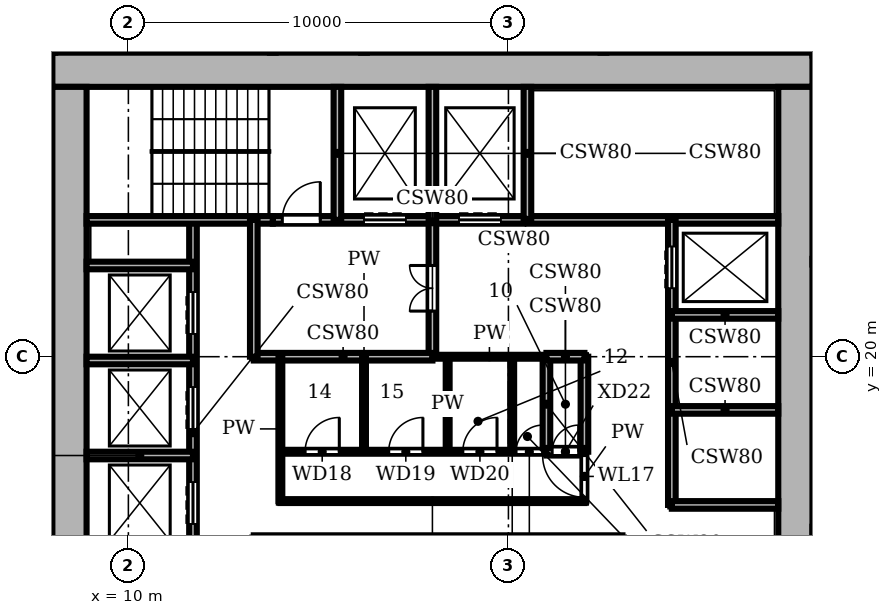
"""IFC4 building model, lengths in metres.
Left out: names, types, materials, properties, quantities, classifications, styles, units other than length and angle.
Written with IfcOpenShell. Run it as: python <this file> out.ifc"""

import sys

from ifc_helpers import new_model, si_unit, direction, frame, frame_2d, origin, place, context, subcontext, project, spatial, rectangle, extrude, element, fill, save


model = new_model("IFC4")
c1 = context("Model", 3, precision=1e-05, world=origin(), true_north=direction((0.0, 1.0)))
c2 = subcontext(c1, "Body", "Model", "MODEL_VIEW")
j1 = project(units=[si_unit("LENGTHUNIT", "METRE"), si_unit("PLANEANGLEUNIT", "RADIAN")], contexts=[c1])
p1 = place(None, origin())
s1 = spatial("IfcSite", under=j1, at=p1, CompositionType="ELEMENT")
p2 = place(p1, origin())
s2 = spatial("IfcBuilding", under=s1, at=p2, CompositionType="ELEMENT")
p3 = place(p2, frame((0.0, 0.0, 35.4)))
s3 = spatial("IfcBuildingStorey", under=s2, at=p3, CompositionType="ELEMENT", Elevation=35.4)
p4 = place(p3, frame((27.55, 8.9, 0.0), z_axis=(0.0, 0.0, 1.0), x_axis=(0.0, 1.0, 0.0)))
e1 = element("IfcWall", 1, at=p4, inside=s3, PredefinedType="SHEAR", context=c2, shape_type="SweptSolid", body=[
    extrude(rectangle(XDim=18.2, YDim=0.9, at=frame_2d((9.1, 0.0))), origin(), (0.0, 0.0, 1.0), 3.9),
])
p5 = place(p4, frame((4.55, 0.0, 0.0)))
e2 = element("IfcOpeningElement", 2, at=p5, cuts=e1, PredefinedType="OPENING", context=c2, shape_type="SweptSolid", body=[
    extrude(rectangle(XDim=1.6, YDim=2.1, at=frame_2d((0.8, 1.05))), frame((0.0, 0.46, 0.0), z_axis=(0.0, -1.0, 0.0), x_axis=(1.0, 0.0, 0.0)), (0.0, 0.0, 1.0), 0.92),
])
p6 = place(p3, frame((28.0, 27.55, 0.0), z_axis=(0.0, 0.0, 1.0), x_axis=(-1.0, 0.0, 0.0)))
e3 = element("IfcWall", 3, at=p6, inside=s3, PredefinedType="SHEAR", context=c2, shape_type="SweptSolid", body=[
    extrude(rectangle(XDim=20.0, YDim=0.9, at=frame_2d((10.0, 0.0))), origin(), (0.0, 0.0, 1.0), 3.9),
])
p7 = place(p3, frame((8.45, 27.1, 0.0), z_axis=(0.0, 0.0, 1.0), x_axis=(0.0, -1.0, 0.0)))
e4 = element("IfcWall", 4, at=p7, inside=s3, PredefinedType="SHEAR", context=c2, shape_type="SweptSolid", body=[
    extrude(rectangle(XDim=18.2, YDim=0.9, at=frame_2d((9.1, 0.0))), origin(), (0.0, 0.0, 1.0), 3.9),
])
p8 = place(p3, frame((24.3, 16.1, 0.0), z_axis=(0.0, 0.0, 1.0), x_axis=(1.0, 0.0, 0.0)))
e5 = element("IfcWall", 5, at=p8, inside=s3, PredefinedType="SHEAR", context=c2, shape_type="SweptSolid", body=[
    extrude(rectangle(XDim=2.8, YDim=0.2, at=frame_2d((1.4, 0.0))), origin(), (0.0, 0.0, 1.0), 3.58),
])
p9 = place(p3, frame((14.0, 16.2, 0.0), z_axis=(0.0, 0.0, 1.0), x_axis=(1.0, 0.0, 0.0)))
e6 = element("IfcWall", 6, at=p9, inside=s3, PredefinedType="PARTITIONING", context=c2, shape_type="SweptSolid", body=[
    extrude(rectangle(XDim=8.0, YDim=0.1, at=frame_2d((4.0, 0.0))), origin(), (0.0, 0.0, 1.0), 3.58),
])
p10 = place(p3, frame((8.9, 17.4, 0.0), z_axis=(0.0, 0.0, 1.0), x_axis=(1.0, 0.0, 0.0)))
e7 = element("IfcWall", 7, at=p10, inside=s3, PredefinedType="SHEAR", context=c2, shape_type="SweptSolid", body=[
    extrude(rectangle(XDim=2.8, YDim=0.2, at=frame_2d((1.4, 0.0))), origin(), (0.0, 0.0, 1.0), 3.58),
])
p11 = place(p3, frame((14.0, 17.5, 0.0), z_axis=(0.0, 0.0, 1.0), x_axis=(1.0, 0.0, 0.0)))
e8 = element("IfcWall", 8, at=p11, inside=s3, PredefinedType="PARTITIONING", context=c2, shape_type="SweptSolid", body=[
    extrude(rectangle(XDim=7.0, YDim=0.1, at=frame_2d((3.5, 0.0))), origin(), (0.0, 0.0, 1.0), 3.58),
])
p12 = place(p11, frame((0.65, 0.0, 0.0)))
e9 = element("IfcOpeningElement", 9, at=p12, cuts=e8, PredefinedType="OPENING", context=c2, shape_type="SweptSolid", body=[
    extrude(rectangle(XDim=0.9, YDim=2.1, at=frame_2d((0.45, 1.05))), frame((0.0, 0.06, 0.0), z_axis=(0.0, -1.0, 0.0), x_axis=(1.0, 0.0, 0.0)), (0.0, 0.0, 1.0), 0.12),
])
p13 = place(p11, frame((2.85, 0.0, 0.0)))
e10 = element("IfcOpeningElement", 10, at=p13, cuts=e8, PredefinedType="OPENING", context=c2, shape_type="SweptSolid", body=[
    extrude(rectangle(XDim=0.9, YDim=2.1, at=frame_2d((0.45, 1.05))), frame((0.0, 0.06, 0.0), z_axis=(0.0, -1.0, 0.0), x_axis=(1.0, 0.0, 0.0)), (0.0, 0.0, 1.0), 0.12),
])
p14 = place(p11, frame((4.8, 0.0, 0.0)))
e11 = element("IfcOpeningElement", 11, at=p14, cuts=e8, PredefinedType="OPENING", context=c2, shape_type="SweptSolid", body=[
    extrude(rectangle(XDim=0.9, YDim=2.1, at=frame_2d((0.45, 1.05))), frame((0.0, 0.06, 0.0), z_axis=(0.0, -1.0, 0.0), x_axis=(1.0, 0.0, 0.0)), (0.0, 0.0, 1.0), 0.12),
])
p15 = place(p11, frame((6.2, 0.0, 0.0)))
e12 = element("IfcOpeningElement", 12, at=p15, cuts=e8, PredefinedType="OPENING", context=c2, shape_type="SweptSolid", body=[
    extrude(rectangle(XDim=0.7, YDim=2.1, at=frame_2d((0.35, 1.05))), frame((0.0, 0.06, 0.0), z_axis=(0.0, -1.0, 0.0), x_axis=(1.0, 0.0, 0.0)), (0.0, 0.0, 1.0), 0.12),
])
p16 = place(p3, frame((21.0, 17.5, 0.0), z_axis=(0.0, 0.0, 1.0), x_axis=(1.0, 0.0, 0.0)))
e13 = element("IfcWall", 13, at=p16, inside=s3, PredefinedType="SHEAR", context=c2, shape_type="SweptSolid", body=[
    extrude(rectangle(XDim=1.0, YDim=0.2, at=frame_2d((0.5, 0.0))), origin(), (0.0, 0.0, 1.0), 3.58),
])
p17 = place(p16, frame((0.15, 0.0, 0.0)))
e14 = element("IfcOpeningElement", 14, at=p17, cuts=e13, PredefinedType="OPENING", context=c2, shape_type="SweptSolid", body=[
    extrude(rectangle(XDim=0.7, YDim=2.1, at=frame_2d((0.35, 1.05))), frame((0.0, 0.11, 0.0), z_axis=(0.0, -1.0, 0.0), x_axis=(1.0, 0.0, 0.0)), (0.0, 0.0, 1.0), 0.22),
])
for number, where, z_axis, x_axis in (
    (15, (24.3, 18.6, 0.0), (0.0, 0.0, 1.0), (1.0, 0.0, 0.0)),
    (16, (8.9, 19.9, 0.0), (0.0, 0.0, 1.0), (1.0, 0.0, 0.0)),
):
    element("IfcWall", number, at=place(p3, frame(where, z_axis=z_axis, x_axis=x_axis)), inside=s3, PredefinedType="SHEAR", context=c2, shape_type="SweptSolid", body=[
        extrude(rectangle(XDim=2.8, YDim=0.2, at=frame_2d((1.4, 0.0))), origin(), (0.0, 0.0, 1.0), 3.58),
    ])
p18 = place(p3, frame((18.0, 20.0, 0.0), z_axis=(0.0, 0.0, 1.0), x_axis=(1.0, 0.0, 0.0)))
e17 = element("IfcWall", 17, at=p18, inside=s3, PredefinedType="PARTITIONING", context=c2, shape_type="SweptSolid", body=[
    extrude(rectangle(XDim=3.0, YDim=0.1, at=frame_2d((1.5, 0.0))), origin(), (0.0, 0.0, 1.0), 3.58),
])
p19 = place(p3, frame((13.3, 20.0, 0.0), z_axis=(0.0, 0.0, 1.0), x_axis=(1.0, 0.0, 0.0)))
e18 = element("IfcWall", 18, at=p19, inside=s3, PredefinedType="SHEAR", context=c2, shape_type="SweptSolid", body=[
    extrude(rectangle(XDim=4.7, YDim=0.2, at=frame_2d((2.35, 0.0))), origin(), (0.0, 0.0, 1.0), 3.58),
])
p20 = place(p3, frame((21.0, 20.0, 0.0), z_axis=(0.0, 0.0, 1.0), x_axis=(1.0, 0.0, 0.0)))
e19 = element("IfcWall", 19, at=p20, inside=s3, PredefinedType="SHEAR", context=c2, shape_type="SweptSolid", body=[
    extrude(rectangle(XDim=1.0, YDim=0.2, at=frame_2d((0.5, 0.0))), origin(), (0.0, 0.0, 1.0), 3.58),
])
for number, where, z_axis, x_axis in (
    (20, (24.3, 21.1, 0.0), (0.0, 0.0, 1.0), (1.0, 0.0, 0.0)),
    (21, (8.9, 22.4, 0.0), (0.0, 0.0, 1.0), (1.0, 0.0, 0.0)),
):
    element("IfcWall", number, at=place(p3, frame(where, z_axis=z_axis, x_axis=x_axis)), inside=s3, PredefinedType="SHEAR", context=c2, shape_type="SweptSolid", body=[
        extrude(rectangle(XDim=2.8, YDim=0.2, at=frame_2d((1.4, 0.0))), origin(), (0.0, 0.0, 1.0), 3.58),
    ])
p21 = place(p3, frame((8.9, 23.6, 0.0), z_axis=(0.0, 0.0, 1.0), x_axis=(1.0, 0.0, 0.0)))
e22 = element("IfcWall", 22, at=p21, inside=s3, PredefinedType="SHEAR", context=c2, shape_type="SweptSolid", body=[
    extrude(rectangle(XDim=4.9, YDim=0.2, at=frame_2d((2.45, 0.0))), origin(), (0.0, 0.0, 1.0), 3.58),
])
p22 = place(p3, frame((13.8, 23.6, 0.0), z_axis=(0.0, 0.0, 1.0), x_axis=(1.0, 0.0, 0.0)))
e23 = element("IfcWall", 23, at=p22, inside=s3, PredefinedType="SHEAR", context=c2, shape_type="SweptSolid", body=[
    extrude(rectangle(XDim=13.3, YDim=0.2, at=frame_2d((6.65, 0.0))), origin(), (0.0, 0.0, 1.0), 3.58),
])
p23 = place(p22, frame((2.4, 0.0, 0.0)))
e24 = element("IfcOpeningElement", 24, at=p23, cuts=e23, PredefinedType="OPENING", context=c2, shape_type="SweptSolid", body=[
    extrude(rectangle(XDim=1.1, YDim=2.1, at=frame_2d((0.55, 1.05))), frame((0.0, 0.11, 0.0), z_axis=(0.0, -1.0, 0.0), x_axis=(1.0, 0.0, 0.0)), (0.0, 0.0, 1.0), 0.22),
])
p24 = place(p22, frame((4.9, 0.0, 0.0)))
e25 = element("IfcOpeningElement", 25, at=p24, cuts=e23, PredefinedType="OPENING", context=c2, shape_type="SweptSolid", body=[
    extrude(rectangle(XDim=1.1, YDim=2.1, at=frame_2d((0.55, 1.05))), frame((0.0, 0.11, 0.0), z_axis=(0.0, -1.0, 0.0), x_axis=(1.0, 0.0, 0.0)), (0.0, 0.0, 1.0), 0.22),
])
p25 = place(p22, frame((0.25, 0.0, 0.0)))
e26 = element("IfcOpeningElement", 26, at=p25, cuts=e23, PredefinedType="OPENING", context=c2, shape_type="SweptSolid", body=[
    extrude(rectangle(XDim=1.0, YDim=2.1, at=frame_2d((0.5, 1.05))), frame((0.0, 0.11, 0.0), z_axis=(0.0, -1.0, 0.0), x_axis=(1.0, 0.0, 0.0)), (0.0, 0.0, 1.0), 0.22),
])
p26 = place(p3, frame((11.7, 12.4, 0.0), z_axis=(0.0, 0.0, 1.0), x_axis=(0.0, 1.0, 0.0)))
e27 = element("IfcWall", 27, at=p26, inside=s3, PredefinedType="SHEAR", context=c2, shape_type="SweptSolid", body=[
    extrude(rectangle(XDim=11.2, YDim=0.2, at=frame_2d((5.6, 0.0))), origin(), (0.0, 0.0, 1.0), 3.58),
])
p27 = place(p26, frame((0.7, 0.0, 0.0)))
e28 = element("IfcOpeningElement", 28, at=p27, cuts=e27, PredefinedType="OPENING", context=c2, shape_type="SweptSolid", body=[
    extrude(rectangle(XDim=1.1, YDim=2.1, at=frame_2d((0.55, 1.05))), frame((0.0, 0.11, 0.0), z_axis=(0.0, -1.0, 0.0), x_axis=(1.0, 0.0, 0.0)), (0.0, 0.0, 1.0), 0.22),
])
p28 = place(p26, frame((3.2, 0.0, 0.0)))
e29 = element("IfcOpeningElement", 29, at=p28, cuts=e27, PredefinedType="OPENING", context=c2, shape_type="SweptSolid", body=[
    extrude(rectangle(XDim=1.1, YDim=2.1, at=frame_2d((0.55, 1.05))), frame((0.0, 0.11, 0.0), z_axis=(0.0, -1.0, 0.0), x_axis=(1.0, 0.0, 0.0)), (0.0, 0.0, 1.0), 0.22),
])
p29 = place(p26, frame((5.7, 0.0, 0.0)))
e30 = element("IfcOpeningElement", 30, at=p29, cuts=e27, PredefinedType="OPENING", context=c2, shape_type="SweptSolid", body=[
    extrude(rectangle(XDim=1.1, YDim=2.1, at=frame_2d((0.55, 1.05))), frame((0.0, 0.11, 0.0), z_axis=(0.0, -1.0, 0.0), x_axis=(1.0, 0.0, 0.0)), (0.0, 0.0, 1.0), 0.22),
])
p30 = place(p26, frame((8.2, 0.0, 0.0)))
e31 = element("IfcOpeningElement", 31, at=p30, cuts=e27, PredefinedType="OPENING", context=c2, shape_type="SweptSolid", body=[
    extrude(rectangle(XDim=1.1, YDim=2.1, at=frame_2d((0.55, 1.05))), frame((0.0, 0.11, 0.0), z_axis=(0.0, -1.0, 0.0), x_axis=(1.0, 0.0, 0.0)), (0.0, 0.0, 1.0), 0.22),
])
p31 = place(p3, frame((13.3, 20.0, 0.0), z_axis=(0.0, 0.0, 1.0), x_axis=(0.0, 1.0, 0.0)))
e32 = element("IfcWall", 32, at=p31, inside=s3, PredefinedType="SHEAR", context=c2, shape_type="SweptSolid", body=[
    extrude(rectangle(XDim=3.6, YDim=0.2, at=frame_2d((1.8, 0.0))), origin(), (0.0, 0.0, 1.0), 3.58),
])
p32 = place(p3, frame((14.0, 16.2, 0.0), z_axis=(0.0, 0.0, 1.0), x_axis=(0.0, 1.0, 0.0)))
e33 = element("IfcWall", 33, at=p32, inside=s3, PredefinedType="PARTITIONING", context=c2, shape_type="SweptSolid", body=[
    extrude(rectangle(XDim=3.8, YDim=0.1, at=frame_2d((1.9, 0.0))), origin(), (0.0, 0.0, 1.0), 3.58),
])
p33 = place(p3, frame((15.5, 23.6, 0.0), z_axis=(0.0, 0.0, 1.0), x_axis=(0.0, 1.0, 0.0)))
e34 = element("IfcWall", 34, at=p33, inside=s3, PredefinedType="SHEAR", context=c2, shape_type="SweptSolid", body=[
    extrude(rectangle(XDim=3.5, YDim=0.2, at=frame_2d((1.75, 0.0))), origin(), (0.0, 0.0, 1.0), 3.58),
])
p34 = place(p3, frame((16.2, 17.5, 0.0), z_axis=(0.0, 0.0, 1.0), x_axis=(0.0, 1.0, 0.0)))
e35 = element("IfcWall", 35, at=p34, inside=s3, PredefinedType="PARTITIONING", context=c2, shape_type="SweptSolid", body=[
    extrude(rectangle(XDim=2.5, YDim=0.1, at=frame_2d((1.25, 0.0))), origin(), (0.0, 0.0, 1.0), 3.58),
])
p35 = place(p3, frame((18.0, 20.0, 0.0), z_axis=(0.0, 0.0, 1.0), x_axis=(0.0, 1.0, 0.0)))
e36 = element("IfcWall", 36, at=p35, inside=s3, PredefinedType="SHEAR", context=c2, shape_type="SweptSolid", body=[
    extrude(rectangle(XDim=7.1, YDim=0.2, at=frame_2d((3.55, 0.0))), origin(), (0.0, 0.0, 1.0), 3.58),
])
p36 = place(p35, frame((1.2, 0.0, 0.0)))
e37 = element("IfcOpeningElement", 37, at=p36, cuts=e36, PredefinedType="OPENING", context=c2, shape_type="SweptSolid", body=[
    extrude(rectangle(XDim=1.2, YDim=2.1, at=frame_2d((0.6, 1.05))), frame((0.0, 0.11, 0.0), z_axis=(0.0, -1.0, 0.0), x_axis=(1.0, 0.0, 0.0)), (0.0, 0.0, 1.0), 0.22),
])
for number, where, z_axis, x_axis in (
    (38, (18.4, 17.5, 0.0), (0.0, 0.0, 1.0), (0.0, 1.0, 0.0)),
    (39, (20.1, 17.5, 0.0), (0.0, 0.0, 1.0), (0.0, 1.0, 0.0)),
):
    element("IfcWall", number, at=place(p3, frame(where, z_axis=z_axis, x_axis=x_axis)), inside=s3, PredefinedType="PARTITIONING", context=c2, shape_type="SweptSolid", body=[
        extrude(rectangle(XDim=2.5, YDim=0.1, at=frame_2d((1.25, 0.0))), origin(), (0.0, 0.0, 1.0), 3.58),
    ])
p37 = place(p3, frame((20.5, 23.6, 0.0), z_axis=(0.0, 0.0, 1.0), x_axis=(0.0, 1.0, 0.0)))
e40 = element("IfcWall", 40, at=p37, inside=s3, PredefinedType="SHEAR", context=c2, shape_type="SweptSolid", body=[
    extrude(rectangle(XDim=3.5, YDim=0.2, at=frame_2d((1.75, 0.0))), origin(), (0.0, 0.0, 1.0), 3.58),
])
p38 = place(p3, frame((21.0, 17.5, 0.0), z_axis=(0.0, 0.0, 1.0), x_axis=(0.0, 1.0, 0.0)))
e41 = element("IfcWall", 41, at=p38, inside=s3, PredefinedType="SHEAR", context=c2, shape_type="SweptSolid", body=[
    extrude(rectangle(XDim=2.5, YDim=0.2, at=frame_2d((1.25, 0.0))), origin(), (0.0, 0.0, 1.0), 3.58),
])
p39 = place(p3, frame((22.0, 16.2, 0.0), z_axis=(0.0, 0.0, 1.0), x_axis=(0.0, 1.0, 0.0)))
e42 = element("IfcWall", 42, at=p39, inside=s3, PredefinedType="PARTITIONING", context=c2, shape_type="SweptSolid", body=[
    extrude(rectangle(XDim=1.3, YDim=0.1, at=frame_2d((0.65, 0.0))), origin(), (0.0, 0.0, 1.0), 3.58),
])
p40 = place(p39, frame((0.1, 0.0, 0.0)))
e43 = element("IfcOpeningElement", 43, at=p40, cuts=e42, PredefinedType="OPENING", context=c2, shape_type="SweptSolid", body=[
    extrude(rectangle(XDim=1.1, YDim=2.1, at=frame_2d((0.55, 1.05))), frame((0.0, 0.06, 0.0), z_axis=(0.0, -1.0, 0.0), x_axis=(1.0, 0.0, 0.0)), (0.0, 0.0, 1.0), 0.12),
])
p41 = place(p3, frame((22.0, 17.5, 0.0), z_axis=(0.0, 0.0, 1.0), x_axis=(0.0, 1.0, 0.0)))
e44 = element("IfcWall", 44, at=p41, inside=s3, PredefinedType="SHEAR", context=c2, shape_type="SweptSolid", body=[
    extrude(rectangle(XDim=2.5, YDim=0.2, at=frame_2d((1.25, 0.0))), origin(), (0.0, 0.0, 1.0), 3.58),
])
p42 = place(p3, frame((24.3, 16.1, 0.0), z_axis=(0.0, 0.0, 1.0), x_axis=(0.0, 1.0, 0.0)))
e45 = element("IfcWall", 45, at=p42, inside=s3, PredefinedType="SHEAR", context=c2, shape_type="SweptSolid", body=[
    extrude(rectangle(XDim=7.5, YDim=0.2, at=frame_2d((3.75, 0.0))), origin(), (0.0, 0.0, 1.0), 3.58),
])
p43 = place(p42, frame((5.7, 0.0, 0.0)))
e46 = element("IfcOpeningElement", 46, at=p43, cuts=e45, PredefinedType="OPENING", context=c2, shape_type="SweptSolid", body=[
    extrude(rectangle(XDim=1.1, YDim=2.1, at=frame_2d((0.55, 1.05))), frame((0.0, 0.11, 0.0), z_axis=(0.0, -1.0, 0.0), x_axis=(1.0, 0.0, 0.0)), (0.0, 0.0, 1.0), 0.22),
])
for number, where, z_axis, x_axis in (
    (47, (13.8, 28.0, 0.0), (0.0, 0.0, 1.0), (0.0, 1.0, 0.0)),
    (48, (16.2, 28.0, 0.0), (0.0, 0.0, 1.0), (0.0, 1.0, 0.0)),
    (49, (22.5, 28.0, 0.0), (0.0, 0.0, 1.0), (0.0, 1.0, 0.0)),
    (50, (28.0, 15.45, 0.0), (0.0, 0.0, 1.0), (1.0, 0.0, 0.0)),
    (51, (28.0, 22.5, 0.0), (0.0, 0.0, 1.0), (1.0, 0.0, 0.0)),
    (52, (28.0, 28.0, 0.0), (0.0, 0.0, 1.0), (1.0, 0.0, 0.0)),
):
    element("IfcWall", number, at=place(p3, frame(where, z_axis=z_axis, x_axis=x_axis)), inside=s3, PredefinedType="PARTITIONING", context=c2, shape_type="SweptSolid", body=[
        extrude(rectangle(XDim=2.8, YDim=0.15, at=frame_2d((1.4, 0.0))), origin(), (0.0, 0.0, 1.0), 3.58),
    ])
p44 = place(p28, origin())
e53 = element("IfcDoor", 53, at=p44, inside=s3, OperationType="DOUBLE_DOOR_SLIDING", PredefinedType="DOOR", context=c2, shape_type="SweptSolid", body=[
    extrude(rectangle(XDim=1.1, YDim=2.1, at=frame_2d((0.55, 1.05))), frame((0.0, 0.025, 0.0), z_axis=(0.0, -1.0, 0.0), x_axis=(1.0, 0.0, 0.0)), (0.0, 0.0, 1.0), 0.05),
])
fill(e29, e53)
p45 = place(p29, origin())
e54 = element("IfcDoor", 54, at=p45, inside=s3, OperationType="DOUBLE_DOOR_SLIDING", PredefinedType="DOOR", context=c2, shape_type="SweptSolid", body=[
    extrude(rectangle(XDim=1.1, YDim=2.1, at=frame_2d((0.55, 1.05))), frame((0.0, 0.025, 0.0), z_axis=(0.0, -1.0, 0.0), x_axis=(1.0, 0.0, 0.0)), (0.0, 0.0, 1.0), 0.05),
])
fill(e30, e54)
p46 = place(p30, origin())
e55 = element("IfcDoor", 55, at=p46, inside=s3, OperationType="DOUBLE_DOOR_SLIDING", PredefinedType="DOOR", context=c2, shape_type="SweptSolid", body=[
    extrude(rectangle(XDim=1.1, YDim=2.1, at=frame_2d((0.55, 1.05))), frame((0.0, 0.025, 0.0), z_axis=(0.0, -1.0, 0.0), x_axis=(1.0, 0.0, 0.0)), (0.0, 0.0, 1.0), 0.05),
])
fill(e31, e55)
p47 = place(p43, origin())
e56 = element("IfcDoor", 56, at=p47, inside=s3, OperationType="DOUBLE_DOOR_SLIDING", PredefinedType="DOOR", context=c2, shape_type="SweptSolid", body=[
    extrude(rectangle(XDim=1.1, YDim=2.1, at=frame_2d((0.55, 1.05))), frame((0.0, 0.025, 0.0), z_axis=(0.0, -1.0, 0.0), x_axis=(1.0, 0.0, 0.0)), (0.0, 0.0, 1.0), 0.05),
])
fill(e46, e56)
p48 = place(p23, origin())
e57 = element("IfcDoor", 57, at=p48, inside=s3, OperationType="DOUBLE_DOOR_SLIDING", PredefinedType="DOOR", context=c2, shape_type="SweptSolid", body=[
    extrude(rectangle(XDim=1.1, YDim=2.1, at=frame_2d((0.55, 1.05))), frame((0.0, 0.025, 0.0), z_axis=(0.0, -1.0, 0.0), x_axis=(1.0, 0.0, 0.0)), (0.0, 0.0, 1.0), 0.05),
])
fill(e24, e57)
p49 = place(p24, origin())
e58 = element("IfcDoor", 58, at=p49, inside=s3, OperationType="DOUBLE_DOOR_SLIDING", PredefinedType="DOOR", context=c2, shape_type="SweptSolid", body=[
    extrude(rectangle(XDim=1.1, YDim=2.1, at=frame_2d((0.55, 1.05))), frame((0.0, 0.025, 0.0), z_axis=(0.0, -1.0, 0.0), x_axis=(1.0, 0.0, 0.0)), (0.0, 0.0, 1.0), 0.05),
])
fill(e25, e58)
p50 = place(p25, origin())
e59 = element("IfcDoor", 59, at=p50, inside=s3, OperationType="SINGLE_SWING_RIGHT", PredefinedType="DOOR", context=c2, shape_type="SweptSolid", body=[
    extrude(rectangle(XDim=1.0, YDim=2.1, at=frame_2d((0.5, 1.05))), frame((0.0, 0.025, 0.0), z_axis=(0.0, -1.0, 0.0), x_axis=(1.0, 0.0, 0.0)), (0.0, 0.0, 1.0), 0.05),
])
fill(e26, e59)
p51 = place(p36, origin())
e60 = element("IfcDoor", 60, at=p51, inside=s3, OperationType="DOUBLE_DOOR_SINGLE_SWING", PredefinedType="DOOR", context=c2, shape_type="SweptSolid", body=[
    extrude(rectangle(XDim=1.2, YDim=2.1, at=frame_2d((0.6, 1.05))), frame((0.0, 0.025, 0.0), z_axis=(0.0, -1.0, 0.0), x_axis=(1.0, 0.0, 0.0)), (0.0, 0.0, 1.0), 0.05),
])
fill(e37, e60)
p52 = place(p40, origin())
e61 = element("IfcDoor", 61, at=p52, inside=s3, OperationType="SINGLE_SWING_RIGHT", PredefinedType="DOOR", context=c2, shape_type="SweptSolid", body=[
    extrude(rectangle(XDim=1.1, YDim=2.1, at=frame_2d((0.55, 1.05))), frame((0.0, 0.025, 0.0), z_axis=(0.0, -1.0, 0.0), x_axis=(1.0, 0.0, 0.0)), (0.0, 0.0, 1.0), 0.05),
])
fill(e43, e61)
p53 = place(p12, origin())
e62 = element("IfcDoor", 62, at=p53, inside=s3, OperationType="SINGLE_SWING_RIGHT", PredefinedType="DOOR", context=c2, shape_type="SweptSolid", body=[
    extrude(rectangle(XDim=0.9, YDim=2.1, at=frame_2d((0.45, 1.05))), frame((0.0, 0.025, 0.0), z_axis=(0.0, -1.0, 0.0), x_axis=(1.0, 0.0, 0.0)), (0.0, 0.0, 1.0), 0.05),
])
fill(e9, e62)
p54 = place(p13, origin())
e63 = element("IfcDoor", 63, at=p54, inside=s3, OperationType="SINGLE_SWING_RIGHT", PredefinedType="DOOR", context=c2, shape_type="SweptSolid", body=[
    extrude(rectangle(XDim=0.9, YDim=2.1, at=frame_2d((0.45, 1.05))), frame((0.0, 0.025, 0.0), z_axis=(0.0, -1.0, 0.0), x_axis=(1.0, 0.0, 0.0)), (0.0, 0.0, 1.0), 0.05),
])
fill(e10, e63)
p55 = place(p14, origin())
e64 = element("IfcDoor", 64, at=p55, inside=s3, OperationType="SINGLE_SWING_RIGHT", PredefinedType="DOOR", context=c2, shape_type="SweptSolid", body=[
    extrude(rectangle(XDim=0.9, YDim=2.1, at=frame_2d((0.45, 1.05))), frame((0.0, 0.025, 0.0), z_axis=(0.0, -1.0, 0.0), x_axis=(1.0, 0.0, 0.0)), (0.0, 0.0, 1.0), 0.05),
])
fill(e11, e64)
p56 = place(p15, origin())
e65 = element("IfcDoor", 65, at=p56, inside=s3, OperationType="SINGLE_SWING_RIGHT", PredefinedType="DOOR", context=c2, shape_type="SweptSolid", body=[
    extrude(rectangle(XDim=0.7, YDim=2.1, at=frame_2d((0.35, 1.05))), frame((0.0, 0.025, 0.0), z_axis=(0.0, -1.0, 0.0), x_axis=(1.0, 0.0, 0.0)), (0.0, 0.0, 1.0), 0.05),
])
fill(e12, e65)
p57 = place(p17, origin())
e66 = element("IfcDoor", 66, at=p57, inside=s3, OperationType="SINGLE_SWING_RIGHT", PredefinedType="DOOR", context=c2, shape_type="SweptSolid", body=[
    extrude(rectangle(XDim=0.7, YDim=2.1, at=frame_2d((0.35, 1.05))), frame((0.0, 0.025, 0.0), z_axis=(0.0, -1.0, 0.0), x_axis=(1.0, 0.0, 0.0)), (0.0, 0.0, 1.0), 0.05),
])
fill(e14, e66)
save(model, sys.argv[1])
